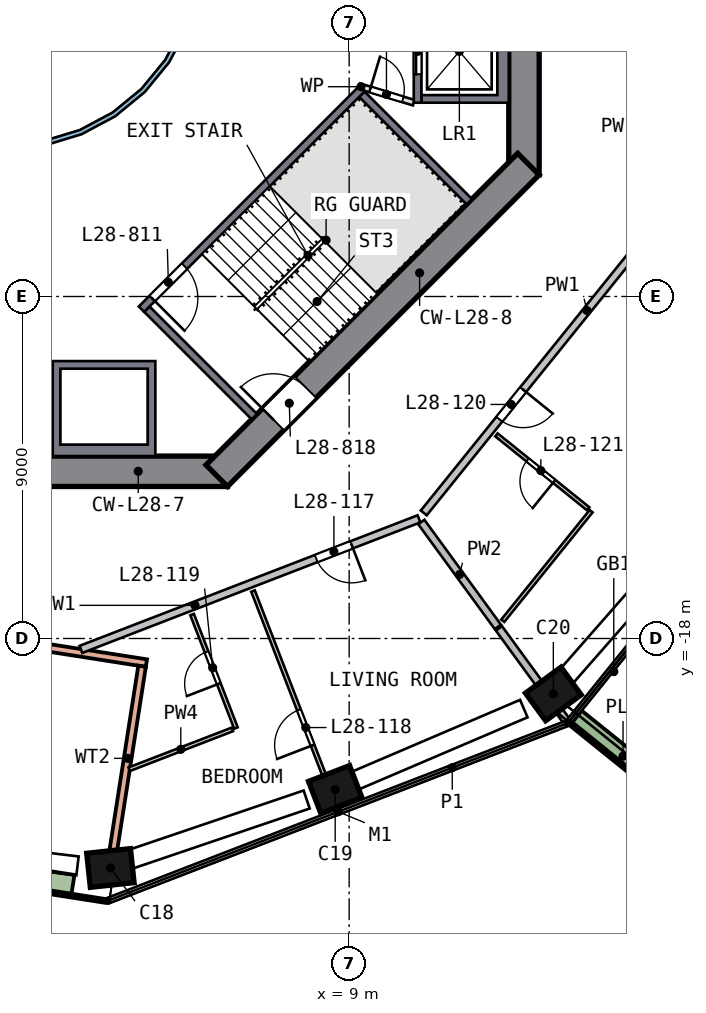
"""IFC4 building model, lengths in metres.
Left out: names, types, materials, properties, quantities, classifications, styles, units other than length and angle.
Written with IfcOpenShell. Run it as: python <this file> out.ifc"""

import sys

from ifc_helpers import new_model, si_unit, direction, frame, frame_2d, origin, origin_2d, place, context, subcontext, project, spatial, polyline, rectangle, outline, extrude, element, fill, save


model = new_model("IFC4")
c1 = context("Model", 3, precision=1e-05, world=origin(), true_north=direction((0.0, 1.0)))
c2 = subcontext(c1, "Body", "Model", "MODEL_VIEW")
j1 = project(units=[si_unit("LENGTHUNIT", "METRE"), si_unit("PLANEANGLEUNIT", "RADIAN")], contexts=[c1])
p1 = place(None, origin())
s1 = spatial("IfcSite", under=j1, at=p1, CompositionType="ELEMENT")
p2 = place(p1, origin())
s2 = spatial("IfcBuilding", under=s1, at=p2, CompositionType="ELEMENT")
p3 = place(p2, frame((0.0, 0.0, 118.5)))
s3 = spatial("IfcBuildingStorey", under=s2, at=p3, CompositionType="ELEMENT", Elevation=118.5)
p4 = place(p3, frame((2.579, -24.055, 0.0), z_axis=(0.114307314, 0.013176869, 0.993358046), x_axis=(-0.987753651, -0.105374926, 0.115060203)))
e1 = element("IfcColumn", 1, at=p4, inside=s3, PredefinedType="COLUMN", context=c2, shape_type="SweptSolid", body=[
    extrude(rectangle(XDim=1.15, YDim=0.9, at=origin_2d()), origin(), (0.0, 0.0, 1.0), 3.02),
])
p5 = place(p3, frame((8.507, -22.022, 0.0), z_axis=(0.104477507, 0.041321986, 0.993668428), x_axis=(0.927089617, 0.357606883, -0.112348381)))
e2 = element("IfcColumn", 2, at=p5, inside=s3, PredefinedType="COLUMN", context=c2, shape_type="SweptSolid", body=[
    extrude(rectangle(XDim=1.15, YDim=0.9, at=origin_2d()), origin(), (0.0, 0.0, 1.0), 3.019),
])
p6 = place(p3, frame((14.261, -19.542, 0.0), z_axis=(0.092399372, 0.068632604, 0.993353875), x_axis=(-0.80243765, -0.585531111, 0.115096203)))
e3 = element("IfcColumn", 3, at=p6, inside=s3, PredefinedType="COLUMN", context=c2, shape_type="SweptSolid", body=[
    extrude(rectangle(XDim=1.15, YDim=0.9, at=origin_2d()), origin(), (0.0, 0.0, 1.0), 3.02),
])
p7 = place(p3, frame((13.6, -5.799, 0.0), z_axis=(0.0, 0.0, 1.0), x_axis=(0.0, 1.0, 0.0)))
e4 = element("IfcWall", 4, at=p7, inside=s3, PredefinedType="SHEAR", context=c2, shape_type="SweptSolid", body=[
    extrude(rectangle(XDim=11.598, YDim=0.8, at=frame_2d((5.799, 0.0))), origin(), (0.0, 0.0, 1.0), 3.5),
])
p8 = place(p7, frame((4.899, 0.0, 0.0)))
e5 = element("IfcOpeningElement", 5, at=p8, cuts=e4, PredefinedType="OPENING", context=c2, shape_type="SweptSolid", body=[
    extrude(rectangle(XDim=1.8, YDim=2.1, at=frame_2d((0.9, 1.05))), frame((0.0, 0.41, 0.0), z_axis=(0.0, -1.0, 0.0), x_axis=(1.0, 0.0, 0.0)), (0.0, 0.0, 1.0), 0.82),
])
p9 = place(p3, frame((-5.799, -13.6, 0.0), z_axis=(0.0, 0.0, 1.0), x_axis=(1.0, 0.0, 0.0)))
e6 = element("IfcWall", 6, at=p9, inside=s3, PredefinedType="SHEAR", context=c2, shape_type="SweptSolid", body=[
    extrude(rectangle(XDim=11.598, YDim=0.8, at=frame_2d((5.799, 0.0))), origin(), (0.0, 0.0, 1.0), 3.5),
])
p10 = place(p9, frame((4.899, 0.0, 0.0)))
e7 = element("IfcOpeningElement", 7, at=p10, cuts=e6, PredefinedType="OPENING", context=c2, shape_type="SweptSolid", body=[
    extrude(rectangle(XDim=1.8, YDim=2.1, at=frame_2d((0.9, 1.05))), frame((0.0, 0.41, 0.0), z_axis=(0.0, -1.0, 0.0), x_axis=(1.0, 0.0, 0.0)), (0.0, 0.0, 1.0), 0.82),
])
p11 = place(p3, frame((5.516, -13.717, 0.0), z_axis=(0.0, 0.0, 1.0), x_axis=(0.707106781, 0.707106781, 0.0)))
e8 = element("IfcWall", 8, at=p11, inside=s3, PredefinedType="SHEAR", context=c2, shape_type="SweptSolid", body=[
    extrude(rectangle(XDim=11.598, YDim=0.8, at=frame_2d((5.799, 0.0))), origin(), (0.0, 0.0, 1.0), 3.5),
])
p12 = place(p11, frame((2.099, 0.0, 0.0)))
e9 = element("IfcOpeningElement", 9, at=p12, cuts=e8, PredefinedType="OPENING", context=c2, shape_type="SweptSolid", body=[
    extrude(rectangle(XDim=1.2, YDim=2.1, at=frame_2d((0.6, 1.05))), frame((0.0, 0.41, 0.0), z_axis=(0.0, -1.0, 0.0), x_axis=(1.0, 0.0, 0.0)), (0.0, 0.0, 1.0), 0.82),
])
p13 = place(p3, frame((14.962, -20.093, 0.0), z_axis=(0.0, 0.0, 1.0), x_axis=(0.778443113, -0.627715158, 0.0)))
e10 = element("IfcWall", 10, at=p13, inside=s3, PredefinedType="SOLIDWALL", context=c2, shape_type="SweptSolid", body=[
    extrude(rectangle(XDim=3.199, YDim=0.5, at=frame_2d((1.6, 0.0))), origin(), (0.0, 0.0, 1.0), 0.7),
])
p14 = place(p3, frame((3.665, -18.648, 0.0), z_axis=(0.0, 0.0, 1.0), x_axis=(-0.988012481, 0.154374016, 0.0)))
e11 = element("IfcWall", 11, at=p14, inside=s3, PredefinedType="SOLIDWALL", context=c2, shape_type="SweptSolid", body=[
    extrude(rectangle(XDim=13.0, YDim=0.2, at=frame_2d((6.5, 0.0))), origin(), (0.0, 0.0, 1.0), 3.0),
])
p15 = place(p14, frame((5.6, 0.0, 0.0)))
e12 = element("IfcOpeningElement", 12, at=p15, cuts=e11, PredefinedType="OPENING", context=c2, shape_type="SweptSolid", body=[
    extrude(rectangle(XDim=1.8, YDim=2.4, at=frame_2d((0.9, 1.2))), frame((0.0, 0.11, 0.0), z_axis=(0.0, -1.0, 0.0), x_axis=(1.0, 0.0, 0.0)), (0.0, 0.0, 1.0), 0.22),
])
p16 = place(p3, frame((2.794, -23.576, 0.0), z_axis=(0.0, 0.0, 1.0), x_axis=(0.15433132, 0.988019152, 0.0)))
e13 = element("IfcWall", 13, at=p16, inside=s3, PredefinedType="SOLIDWALL", context=c2, shape_type="SweptSolid", body=[
    extrude(rectangle(XDim=4.904, YDim=0.2, at=frame_2d((2.452, 0.0))), origin(), (0.0, 0.0, 1.0), 3.0),
])
p17 = place(p3, frame((-10.08, -22.927, 0.0), z_axis=(0.0, 0.0, 1.0), x_axis=(0.988015568, -0.154354259, 0.0)))
e14 = element("IfcWall", 14, at=p17, inside=s3, PredefinedType="SOLIDWALL", context=c2, shape_type="SweptSolid", body=[
    extrude(rectangle(XDim=12.84, YDim=0.1, at=frame_2d((6.42, 0.0))), origin(), (0.0, 0.0, 1.0), 0.7),
])
p18 = place(p3, frame((-2.689, -23.778, 0.0), z_axis=(0.0, 0.0, 1.0), x_axis=(0.988012034, -0.15437688, 0.0)))
e15 = element("IfcWall", 15, at=p18, inside=s3, PredefinedType="SOLIDWALL", context=c2, shape_type="SweptSolid", body=[
    extrude(rectangle(XDim=4.476, YDim=0.5, at=frame_2d((2.238, 0.0))), origin(), (0.0, 0.0, 1.0), 0.7),
])
p19 = place(p3, origin())
e16 = element("IfcWall", 16, at=p19, inside=s3, PredefinedType="SOLIDWALL", context=c2, shape_type="SweptSolid", body=[
    extrude(outline(polyline([(13.2, -3.9), (10.9, -3.9), (10.9, -3.7), (12.9, -3.7), (12.9, -1.4), (10.9, -1.4), (10.9, -1.2), (13.2, -1.2), (13.2, -3.9)])), origin(), (0.0, 0.0, 1.0), 3.0),
])
p20 = place(p3, frame((10.8, -1.2, 0.0), z_axis=(0.0, 0.0, 1.0), x_axis=(0.0, -1.0, 0.0)))
e17 = element("IfcWall", 17, at=p20, inside=s3, PredefinedType="SOLIDWALL", context=c2, shape_type="SweptSolid", body=[
    extrude(rectangle(XDim=2.7, YDim=0.2, at=frame_2d((1.35, 0.0))), origin(), (0.0, 0.0, 1.0), 3.0),
])
p21 = place(p20, frame((0.75, 0.0, 0.0)))
e18 = element("IfcOpeningElement", 18, at=p21, cuts=e17, PredefinedType="OPENING", context=c2, shape_type="SweptSolid", body=[
    extrude(rectangle(XDim=1.2, YDim=2.1, at=frame_2d((0.6, 1.05))), frame((0.0, 0.11, 0.0), z_axis=(0.0, -1.0, 0.0), x_axis=(1.0, 0.0, 0.0)), (0.0, 0.0, 1.0), 0.22),
])
p22 = place(p3, origin())
e19 = element("IfcWall", 19, at=p22, inside=s3, PredefinedType="SOLIDWALL", context=c2, shape_type="SweptSolid", body=[
    extrude(outline(polyline([(3.9, -10.7), (3.9, -13.2), (1.2, -13.2), (1.2, -10.7), (3.9, -10.7)]), holes=[polyline([(1.4, -12.9), (3.7, -12.9), (3.7, -10.9), (1.4, -10.9), (1.4, -12.9)])]), origin(), (0.0, 0.0, 1.0), 3.0),
])
p23 = place(p3, frame((9.334, -3.535, 0.0), z_axis=(0.0, 0.0, 1.0), x_axis=(-0.707106781, -0.707106781, 0.0)))
e20 = element("IfcWall", 20, at=p23, inside=s3, PredefinedType="SOLIDWALL", context=c2, shape_type="SweptSolid", body=[
    extrude(rectangle(XDim=8.2, YDim=0.2, at=frame_2d((4.1, 0.0))), origin(), (0.0, 0.0, 1.0), 3.0),
])
p24 = place(p23, frame((6.6, 0.0, 0.0)))
e21 = element("IfcOpeningElement", 21, at=p24, cuts=e20, PredefinedType="OPENING", context=c2, shape_type="SweptSolid", body=[
    extrude(rectangle(XDim=1.2, YDim=2.1, at=frame_2d((0.6, 1.05))), frame((0.0, 0.11, 0.0), z_axis=(0.0, -1.0, 0.0), x_axis=(1.0, 0.0, 0.0)), (0.0, 0.0, 1.0), 0.22),
])
for number, where, z_axis, x_axis in (
    (22, (3.677, -9.334, 0.0), (0.0, 0.0, 1.0), (0.707, -0.707, 0.0)),
    (23, (9.334, -3.677, 0.0), (0.0, 0.0, 1.0), (0.707, -0.707, 0.0)),
):
    element("IfcWall", number, at=place(p3, frame(where, z_axis=z_axis, x_axis=x_axis)), inside=s3, PredefinedType="SOLIDWALL", context=c2, shape_type="SweptSolid", body=[
        extrude(rectangle(XDim=4.0, YDim=0.2, at=frame_2d((2.0, 0.0))), origin(), (0.0, 0.0, 1.0), 3.0),
    ])
p25 = place(p3, frame((9.263, -3.465, 0.0), z_axis=(0.0, 0.0, 1.0), x_axis=(0.957084567, -0.289808785, 0.0)))
e24 = element("IfcWall", 24, at=p25, inside=s3, PredefinedType="PARTITIONING", context=c2, shape_type="SweptSolid", body=[
    extrude(rectangle(XDim=1.501, YDim=0.15, at=frame_2d((0.75, 0.0))), origin(), (0.0, 0.0, 1.0), 3.0),
])
p26 = place(p25, frame((0.301, 0.0, 0.0)))
e25 = element("IfcOpeningElement", 25, at=p26, cuts=e24, PredefinedType="OPENING", context=c2, shape_type="SweptSolid", body=[
    extrude(rectangle(XDim=0.9, YDim=2.1, at=frame_2d((0.45, 1.05))), frame((0.0, 0.085, 0.0), z_axis=(0.0, -1.0, 0.0), x_axis=(1.0, 0.0, 0.0)), (0.0, 0.0, 1.0), 0.17),
])
p27 = place(p3, origin())
e26 = element("IfcWall", 26, at=p27, inside=s3, PredefinedType="SOLIDWALL", context=c2, shape_type="SweptSolid", body=[
    extrude(outline(polyline([(5.021, -0.999), (4.73, -1.959), (4.257, -2.844), (3.62, -3.62), (2.844, -4.257), (1.959, -4.73), (0.999, -5.021), (0.0, -5.12), (-0.999, -5.021), (-1.959, -4.73), (-2.844, -4.257), (-3.62, -3.62), (-4.257, -2.844), (-4.73, -1.959), (-5.021, -0.999), (-5.12, 0.0), (-5.021, 0.999), (-4.73, 1.959), (-4.257, 2.844), (-3.62, 3.62), (-2.844, 4.257), (-1.959, 4.73), (-0.999, 5.021), (0.0, 5.12), (0.999, 5.021), (1.959, 4.73), (2.844, 4.257), (3.62, 3.62), (4.257, 2.844), (4.73, 1.959), (5.021, 0.999), (5.12, 0.0), (5.021, -0.999)]), holes=[polyline([(4.904, 0.976), (4.619, 1.913), (4.157, 2.778), (3.535, 3.535), (2.778, 4.157), (1.913, 4.619), (0.976, 4.904), (0.0, 5.0), (-0.976, 4.904), (-1.913, 4.619), (-2.778, 4.157), (-3.535, 3.535), (-4.157, 2.778), (-4.619, 1.913), (-4.904, 0.976), (-5.0, 0.0), (-4.904, -0.976), (-4.619, -1.913), (-4.157, -2.778), (-3.535, -3.535), (-2.778, -4.157), (-1.913, -4.619), (-0.976, -4.904), (0.0, -5.0), (0.976, -4.904), (1.913, -4.619), (2.778, -4.157), (3.535, -3.535), (4.157, -2.778), (4.619, -1.913), (4.904, -0.976), (5.0, 0.0), (4.904, 0.976)])]), origin(), (0.0, 0.0, 1.0), 3.0),
])
p28 = place(p3, frame((10.837, -14.851, 0.0), z_axis=(0.0, 0.0, 1.0), x_axis=(-0.932826689, -0.360325365, 0.0)))
e27 = element("IfcWall", 27, at=p28, inside=s3, PredefinedType="SOLIDWALL", context=c2, shape_type="SweptSolid", body=[
    extrude(rectangle(XDim=9.537, YDim=0.2, at=frame_2d((4.768, 0.0))), origin(), (0.0, 0.0, 1.0), 3.0),
])
p29 = place(p28, frame((1.9, 0.0, 0.0)))
e28 = element("IfcOpeningElement", 28, at=p29, cuts=e27, PredefinedType="OPENING", context=c2, shape_type="SweptSolid", body=[
    extrude(rectangle(XDim=1.0, YDim=2.1, at=frame_2d((0.5, 1.05))), frame((0.0, 0.11, 0.0), z_axis=(0.0, -1.0, 0.0), x_axis=(1.0, 0.0, 0.0)), (0.0, 0.0, 1.0), 0.22),
])
p30 = place(p3, frame((16.811, -7.443, 0.0), z_axis=(0.0, 0.0, 1.0), x_axis=(-0.627684838, -0.778467561, 0.0)))
e29 = element("IfcWall", 29, at=p30, inside=s3, PredefinedType="SOLIDWALL", context=c2, shape_type="SweptSolid", body=[
    extrude(rectangle(XDim=9.317, YDim=0.2, at=frame_2d((4.658, 0.0))), origin(), (0.0, 0.0, 1.0), 3.0),
])
p31 = place(p30, frame((5.15, 0.0, 0.0)))
e30 = element("IfcOpeningElement", 30, at=p31, cuts=e29, PredefinedType="OPENING", context=c2, shape_type="SweptSolid", body=[
    extrude(rectangle(XDim=1.0, YDim=2.1, at=frame_2d((0.5, 1.05))), frame((0.0, 0.11, 0.0), z_axis=(0.0, -1.0, 0.0), x_axis=(1.0, 0.0, 0.0)), (0.0, 0.0, 1.0), 0.22),
])
p32 = place(p3, frame((10.898, -14.935, 0.0), z_axis=(0.0, 0.0, 1.0), x_axis=(0.589504337, -0.807765211, 0.0)))
e31 = element("IfcWall", 31, at=p32, inside=s3, PredefinedType="SOLIDWALL", context=c2, shape_type="SweptSolid", body=[
    extrude(rectangle(XDim=3.418, YDim=0.2, at=frame_2d((1.709, 0.0))), origin(), (0.0, 0.0, 1.0), 3.0),
])
p33 = place(p3, frame((12.941, -17.733, 0.0), z_axis=(0.0, 0.0, 1.0), x_axis=(0.58946764, -0.807791991, 0.0)))
e32 = element("IfcWall", 32, at=p33, inside=s3, PredefinedType="SOLIDWALL", context=c2, shape_type="SweptSolid", body=[
    extrude(rectangle(XDim=3.011, YDim=0.2, at=frame_2d((1.506, 0.0))), origin(), (0.0, 0.0, 1.0), 3.0),
])
p34 = place(p3, frame((3.211, -21.441, 0.0), z_axis=(0.0, 0.0, 1.0), x_axis=(0.932845531, 0.360276582, 0.0)))
e33 = element("IfcWall", 33, at=p34, inside=s3, PredefinedType="PARTITIONING", context=c2, shape_type="SweptSolid", body=[
    extrude(rectangle(XDim=2.912, YDim=0.1, at=frame_2d((1.456, 0.0))), origin(), (0.0, 0.0, 1.0), 3.0),
])
p35 = place(p3, frame((6.021, -20.356, 0.0), z_axis=(0.0, 0.0, 1.0), x_axis=(-0.360328369, 0.932825528, 0.0)))
e34 = element("IfcWall", 34, at=p35, inside=s3, PredefinedType="PARTITIONING", context=c2, shape_type="SweptSolid", body=[
    extrude(rectangle(XDim=3.2, YDim=0.1, at=frame_2d((1.6, 0.0))), origin(), (0.0, 0.0, 1.0), 3.0),
])
p36 = place(p35, frame((1.25, 0.0, 0.0)))
e35 = element("IfcOpeningElement", 35, at=p36, cuts=e34, PredefinedType="OPENING", context=c2, shape_type="SweptSolid", body=[
    extrude(rectangle(XDim=0.9, YDim=2.1, at=frame_2d((0.45, 1.05))), frame((0.0, 0.06, 0.0), z_axis=(0.0, -1.0, 0.0), x_axis=(1.0, 0.0, 0.0)), (0.0, 0.0, 1.0), 0.12),
])
p37 = place(p3, frame((8.687, -22.489, 0.0), z_axis=(0.0, 0.0, 1.0), x_axis=(-0.360324702, 0.932826945, 0.0)))
e36 = element("IfcWall", 36, at=p37, inside=s3, PredefinedType="PARTITIONING", context=c2, shape_type="SweptSolid", body=[
    extrude(rectangle(XDim=6.15, YDim=0.1, at=frame_2d((3.075, 0.0))), origin(), (0.0, 0.0, 1.0), 3.0),
])
p38 = place(p37, frame((1.8, 0.0, 0.0)))
e37 = element("IfcOpeningElement", 37, at=p38, cuts=e36, PredefinedType="OPENING", context=c2, shape_type="SweptSolid", body=[
    extrude(rectangle(XDim=1.0, YDim=2.1, at=frame_2d((0.5, 1.05))), frame((0.0, 0.06, 0.0), z_axis=(0.0, -1.0, 0.0), x_axis=(1.0, 0.0, 0.0)), (0.0, 0.0, 1.0), 0.12),
])
p39 = place(p3, frame((15.289, -14.587, 0.0), z_axis=(0.0, 0.0, 1.0), x_axis=(-0.778450282, 0.627706268, 0.0)))
e38 = element("IfcWall", 38, at=p39, inside=s3, PredefinedType="PARTITIONING", context=c2, shape_type="SweptSolid", body=[
    extrude(rectangle(XDim=3.1, YDim=0.1, at=frame_2d((1.55, 0.0))), origin(), (0.0, 0.0, 1.0), 3.0),
])
p40 = place(p39, frame((1.15, 0.0, 0.0)))
e39 = element("IfcOpeningElement", 39, at=p40, cuts=e38, PredefinedType="OPENING", context=c2, shape_type="SweptSolid", body=[
    extrude(rectangle(XDim=0.9, YDim=2.1, at=frame_2d((0.45, 1.05))), frame((0.0, 0.06, 0.0), z_axis=(0.0, -1.0, 0.0), x_axis=(1.0, 0.0, 0.0)), (0.0, 0.0, 1.0), 0.12),
])
p41 = place(p3, frame((15.367, -14.65, 0.0), z_axis=(0.0, 0.0, 1.0), x_axis=(-0.627672573, -0.778477451, 0.0)))
e40 = element("IfcWall", 40, at=p41, inside=s3, PredefinedType="PARTITIONING", context=c2, shape_type="SweptSolid", body=[
    extrude(rectangle(XDim=3.704, YDim=0.1, at=frame_2d((1.852, 0.0))), origin(), (0.0, 0.0, 1.0), 3.0),
])
p42 = place(p21, origin())
e41 = element("IfcDoor", 41, at=p42, inside=s3, OperationType="DOUBLE_DOOR_SLIDING", PredefinedType="DOOR", context=c2, shape_type="SweptSolid", body=[
    extrude(rectangle(XDim=1.2, YDim=2.1, at=frame_2d((0.6, 1.05))), frame((0.0, 0.025, 0.0), z_axis=(0.0, -1.0, 0.0), x_axis=(1.0, 0.0, 0.0)), (0.0, 0.0, 1.0), 0.05),
])
fill(e18, e41)
p43 = place(p24, origin())
e42 = element("IfcDoor", 42, at=p43, inside=s3, OperationType="SINGLE_SWING_RIGHT", PredefinedType="DOOR", context=c2, shape_type="SweptSolid", body=[
    extrude(rectangle(XDim=1.2, YDim=2.1, at=frame_2d((0.6, 1.05))), frame((0.0, 0.025, 0.0), z_axis=(0.0, -1.0, 0.0), x_axis=(1.0, 0.0, 0.0)), (0.0, 0.0, 1.0), 0.05),
])
fill(e21, e42)
p44 = place(p12, origin())
e43 = element("IfcDoor", 43, at=p44, inside=s3, OperationType="SINGLE_SWING_LEFT", PredefinedType="DOOR", context=c2, shape_type="SweptSolid", body=[
    extrude(rectangle(XDim=1.2, YDim=2.1, at=frame_2d((0.6, 1.05))), frame((0.0, 0.025, 0.0), z_axis=(0.0, -1.0, 0.0), x_axis=(1.0, 0.0, 0.0)), (0.0, 0.0, 1.0), 0.05),
])
fill(e9, e43)
p45 = place(p26, origin())
e44 = element("IfcDoor", 44, at=p45, inside=s3, OperationType="SINGLE_SWING_LEFT", PredefinedType="DOOR", context=c2, shape_type="SweptSolid", body=[
    extrude(rectangle(XDim=0.9, YDim=2.1, at=frame_2d((0.45, 1.05))), frame((0.0, 0.025, 0.0), z_axis=(0.0, -1.0, 0.0), x_axis=(1.0, 0.0, 0.0)), (0.0, 0.0, 1.0), 0.05),
])
fill(e25, e44)
p46 = place(p29, origin())
e45 = element("IfcDoor", 45, at=p46, inside=s3, OperationType="SINGLE_SWING_LEFT", PredefinedType="DOOR", context=c2, shape_type="SweptSolid", body=[
    extrude(rectangle(XDim=1.0, YDim=2.1, at=frame_2d((0.5, 1.05))), frame((0.0, 0.025, 0.0), z_axis=(0.0, -1.0, 0.0), x_axis=(1.0, 0.0, 0.0)), (0.0, 0.0, 1.0), 0.05),
])
fill(e28, e45)
p47 = place(p38, origin())
e46 = element("IfcDoor", 46, at=p47, inside=s3, OperationType="SINGLE_SWING_LEFT", PredefinedType="DOOR", context=c2, shape_type="SweptSolid", body=[
    extrude(rectangle(XDim=1.0, YDim=2.1, at=frame_2d((0.5, 1.05))), frame((0.0, 0.025, 0.0), z_axis=(0.0, -1.0, 0.0), x_axis=(1.0, 0.0, 0.0)), (0.0, 0.0, 1.0), 0.05),
])
fill(e37, e46)
p48 = place(p36, origin())
e47 = element("IfcDoor", 47, at=p48, inside=s3, OperationType="SINGLE_SWING_LEFT", PredefinedType="DOOR", context=c2, shape_type="SweptSolid", body=[
    extrude(rectangle(XDim=0.9, YDim=2.1, at=frame_2d((0.45, 1.05))), frame((0.0, 0.025, 0.0), z_axis=(0.0, -1.0, 0.0), x_axis=(1.0, 0.0, 0.0)), (0.0, 0.0, 1.0), 0.05),
])
fill(e35, e47)
p49 = place(p31, origin())
e48 = element("IfcDoor", 48, at=p49, inside=s3, OperationType="SINGLE_SWING_LEFT", PredefinedType="DOOR", context=c2, shape_type="SweptSolid", body=[
    extrude(rectangle(XDim=1.0, YDim=2.1, at=frame_2d((0.5, 1.05))), frame((0.0, 0.025, 0.0), z_axis=(0.0, -1.0, 0.0), x_axis=(1.0, 0.0, 0.0)), (0.0, 0.0, 1.0), 0.05),
])
fill(e30, e48)
p50 = place(p40, origin())
e49 = element("IfcDoor", 49, at=p50, inside=s3, OperationType="SINGLE_SWING_LEFT", PredefinedType="DOOR", context=c2, shape_type="SweptSolid", body=[
    extrude(rectangle(XDim=0.9, YDim=2.1, at=frame_2d((0.45, 1.05))), frame((0.0, 0.025, 0.0), z_axis=(0.0, -1.0, 0.0), x_axis=(1.0, 0.0, 0.0)), (0.0, 0.0, 1.0), 0.05),
])
fill(e39, e49)
save(model, sys.argv[1])
